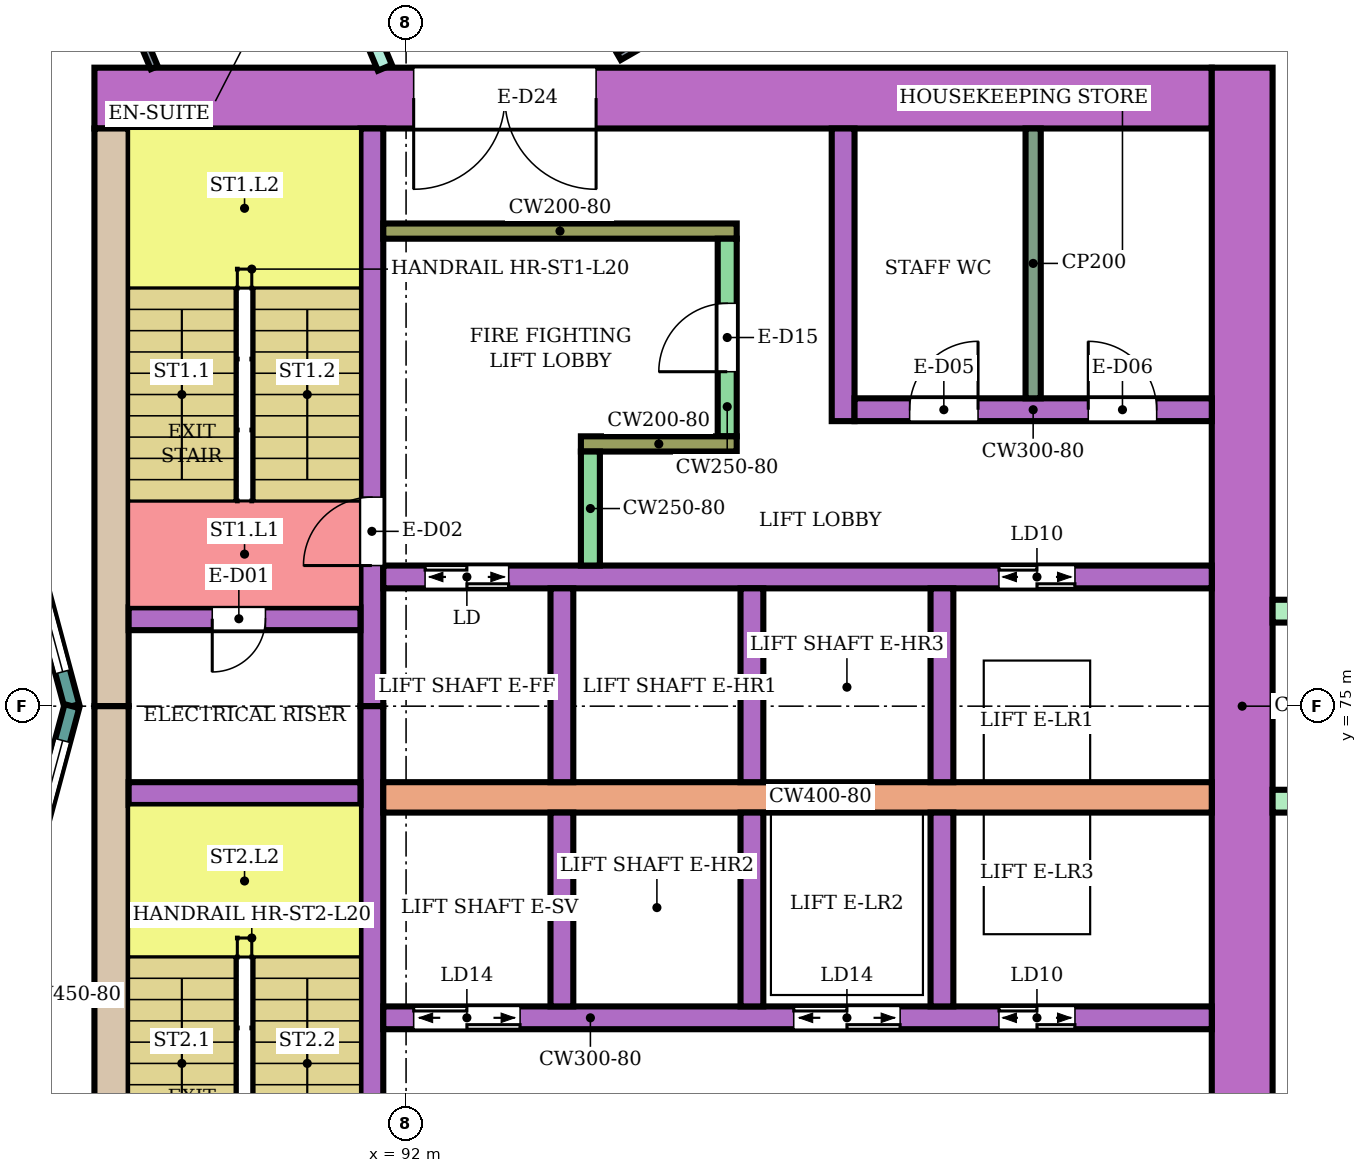
"""IFC4 building model, lengths in metres.
Left out: names, types, materials, properties, quantities, classifications, styles, units other than length and angle.
Written with IfcOpenShell. Run it as: python <this file> out.ifc"""

import sys

from ifc_helpers import new_model, si_unit, direction, frame, frame_2d, origin, place, context, subcontext, project, spatial, rectangle, extrude, element, fill, save


model = new_model("IFC4")
c1 = context("Model", 3, precision=1e-05, world=origin(), true_north=direction((0.0, 1.0)))
c2 = subcontext(c1, "Body", "Model", "MODEL_VIEW")
j1 = project(units=[si_unit("LENGTHUNIT", "METRE"), si_unit("PLANEANGLEUNIT", "RADIAN")], contexts=[c1])
p1 = place(None, origin())
s1 = spatial("IfcSite", under=j1, at=p1, CompositionType="ELEMENT")
p2 = place(p1, origin())
s2 = spatial("IfcBuilding", under=s1, at=p2, CompositionType="ELEMENT")
p3 = place(p2, frame((0.0, 0.0, 90.0)))
s3 = spatial("IfcBuildingStorey", under=s2, at=p3, CompositionType="ELEMENT", Elevation=90.0)
p4 = place(p3, frame((87.9, 83.0, 0.0), z_axis=(0.0, 0.0, 1.0), x_axis=(1.0, 0.0, 0.0)))
e1 = element("IfcWall", 1, at=p4, inside=s3, PredefinedType="SHEAR", context=c2, shape_type="SweptSolid", body=[
    extrude(rectangle(XDim=14.7, YDim=0.8, at=frame_2d((7.35, 0.0))), origin(), (0.0, 0.0, 1.0), 3.48),
])
p5 = place(p4, frame((4.2, 0.0, 0.0)))
e2 = element("IfcOpeningElement", 2, at=p5, cuts=e1, PredefinedType="OPENING", context=c2, shape_type="SweptSolid", body=[
    extrude(rectangle(XDim=2.4, YDim=2.4, at=frame_2d((1.2, 1.2))), frame((0.0, 0.41, 0.0), z_axis=(0.0, -1.0, 0.0), x_axis=(1.0, 0.0, 0.0)), (0.0, 0.0, 1.0), 0.82),
])
for number, where, z_axis, x_axis in (
    (3, (88.125, 75.0, 0.0), (0.0, 0.0, 1.0), (0.0, 1.0, 0.0)),
    (4, (88.125, 67.4, 0.0), (0.0, 0.0, 1.0), (0.0, 1.0, 0.0)),
):
    element("IfcWall", number, at=place(p3, frame(where, z_axis=z_axis, x_axis=x_axis)), inside=s3, PredefinedType="SHEAR", context=c2, shape_type="SweptSolid", body=[
        extrude(rectangle(XDim=7.6, YDim=0.45, at=frame_2d((3.8, 0.0))), origin(), (0.0, 0.0, 1.0), 3.48),
    ])
p6 = place(p3, frame((103.0, 66.6, 0.0), z_axis=(0.0, 0.0, 1.0), x_axis=(0.0, 1.0, 0.0)))
e5 = element("IfcWall", 5, at=p6, inside=s3, PredefinedType="SHEAR", context=c2, shape_type="SweptSolid", body=[
    extrude(rectangle(XDim=16.8, YDim=0.8, at=frame_2d((8.4, 0.0))), origin(), (0.0, 0.0, 1.0), 3.48),
])
p7 = place(p3, frame((91.55, 75.0, 0.0), z_axis=(0.0, 0.0, 1.0), x_axis=(0.0, 1.0, 0.0)))
e6 = element("IfcWall", 6, at=p7, inside=s3, PredefinedType="SHEAR", context=c2, shape_type="SweptSolid", body=[
    extrude(rectangle(XDim=7.6, YDim=0.3, at=frame_2d((3.8, 0.0))), origin(), (0.0, 0.0, 1.0), 3.48),
])
p8 = place(p7, frame((1.85, 0.0, 0.0)))
e7 = element("IfcOpeningElement", 7, at=p8, cuts=e6, PredefinedType="OPENING", context=c2, shape_type="SweptSolid", body=[
    extrude(rectangle(XDim=0.9, YDim=2.1, at=frame_2d((0.45, 1.05))), frame((0.0, 0.16, 0.0), z_axis=(0.0, -1.0, 0.0), x_axis=(1.0, 0.0, 0.0)), (0.0, 0.0, 1.0), 0.32),
])
p9 = place(p3, frame((91.55, 67.4, 0.0), z_axis=(0.0, 0.0, 1.0), x_axis=(0.0, 1.0, 0.0)))
e8 = element("IfcWall", 8, at=p9, inside=s3, PredefinedType="SHEAR", context=c2, shape_type="SweptSolid", body=[
    extrude(rectangle(XDim=7.6, YDim=0.3, at=frame_2d((3.8, 0.0))), origin(), (0.0, 0.0, 1.0), 3.48),
])
p10 = place(p9, frame((0.25, 0.0, 0.0)))
e9 = element("IfcOpeningElement", 9, at=p10, cuts=e8, PredefinedType="OPENING", context=c2, shape_type="SweptSolid", body=[
    extrude(rectangle(XDim=0.9, YDim=2.1, at=frame_2d((0.45, 1.05))), frame((0.0, 0.16, 0.0), z_axis=(0.0, -1.0, 0.0), x_axis=(1.0, 0.0, 0.0)), (0.0, 0.0, 1.0), 0.32),
])
p11 = place(p3, frame((88.35, 76.15, 0.0), z_axis=(0.0, 0.0, 1.0), x_axis=(1.0, 0.0, 0.0)))
e10 = element("IfcWall", 10, at=p11, inside=s3, PredefinedType="SHEAR", context=c2, shape_type="SweptSolid", body=[
    extrude(rectangle(XDim=3.05, YDim=0.3, at=frame_2d((1.525, 0.0))), origin(), (0.0, 0.0, 1.0), 3.48),
])
p12 = place(p11, frame((1.1, 0.0, 0.0)))
e11 = element("IfcOpeningElement", 11, at=p12, cuts=e10, PredefinedType="OPENING", context=c2, shape_type="SweptSolid", body=[
    extrude(rectangle(XDim=0.7, YDim=2.0, at=frame_2d((0.35, 1.0))), frame((0.0, 0.16, 0.0), z_axis=(0.0, -1.0, 0.0), x_axis=(1.0, 0.0, 0.0)), (0.0, 0.0, 1.0), 0.32),
])
p13 = place(p3, frame((88.35, 73.85, 0.0), z_axis=(0.0, 0.0, 1.0), x_axis=(1.0, 0.0, 0.0)))
e12 = element("IfcWall", 12, at=p13, inside=s3, PredefinedType="SHEAR", context=c2, shape_type="SweptSolid", body=[
    extrude(rectangle(XDim=3.05, YDim=0.3, at=frame_2d((1.525, 0.0))), origin(), (0.0, 0.0, 1.0), 3.48),
])
p14 = place(p3, frame((91.7, 76.7, 0.0), z_axis=(0.0, 0.0, 1.0), x_axis=(1.0, 0.0, 0.0)))
e13 = element("IfcWall", 13, at=p14, inside=s3, PredefinedType="SHEAR", context=c2, shape_type="SweptSolid", body=[
    extrude(rectangle(XDim=10.9, YDim=0.3, at=frame_2d((5.45, 0.0))), origin(), (0.0, 0.0, 1.0), 3.48),
])
p15 = place(p14, frame((0.55, 0.0, 0.0)))
e14 = element("IfcOpeningElement", 14, at=p15, cuts=e13, PredefinedType="OPENING", context=c2, shape_type="SweptSolid", body=[
    extrude(rectangle(XDim=1.1, YDim=2.1, at=frame_2d((0.55, 1.05))), frame((0.0, 0.16, 0.0), z_axis=(0.0, -1.0, 0.0), x_axis=(1.0, 0.0, 0.0)), (0.0, 0.0, 1.0), 0.32),
])
p16 = place(p14, frame((8.1, 0.0, 0.0)))
e15 = element("IfcOpeningElement", 15, at=p16, cuts=e13, PredefinedType="OPENING", context=c2, shape_type="SweptSolid", body=[
    extrude(rectangle(XDim=1.0, YDim=2.1, at=frame_2d((0.5, 1.05))), frame((0.0, 0.16, 0.0), z_axis=(0.0, -1.0, 0.0), x_axis=(1.0, 0.0, 0.0)), (0.0, 0.0, 1.0), 0.32),
])
p17 = place(p3, frame((91.7, 73.8, 0.0), z_axis=(0.0, 0.0, 1.0), x_axis=(1.0, 0.0, 0.0)))
e16 = element("IfcWall", 16, at=p17, inside=s3, PredefinedType="SHEAR", context=c2, shape_type="SweptSolid", body=[
    extrude(rectangle(XDim=10.9, YDim=0.4, at=frame_2d((5.45, 0.0))), origin(), (0.0, 0.0, 1.0), 3.48),
])
p18 = place(p3, frame((91.7, 70.9, 0.0), z_axis=(0.0, 0.0, 1.0), x_axis=(1.0, 0.0, 0.0)))
e17 = element("IfcWall", 17, at=p18, inside=s3, PredefinedType="SHEAR", context=c2, shape_type="SweptSolid", body=[
    extrude(rectangle(XDim=10.9, YDim=0.3, at=frame_2d((5.45, 0.0))), origin(), (0.0, 0.0, 1.0), 3.48),
])
p19 = place(p18, frame((0.4, 0.0, 0.0)))
e18 = element("IfcOpeningElement", 18, at=p19, cuts=e17, PredefinedType="OPENING", context=c2, shape_type="SweptSolid", body=[
    extrude(rectangle(XDim=1.4, YDim=2.1, at=frame_2d((0.7, 1.05))), frame((0.0, 0.16, 0.0), z_axis=(0.0, -1.0, 0.0), x_axis=(1.0, 0.0, 0.0)), (0.0, 0.0, 1.0), 0.32),
])
p20 = place(p18, frame((5.4, 0.0, 0.0)))
e19 = element("IfcOpeningElement", 19, at=p20, cuts=e17, PredefinedType="OPENING", context=c2, shape_type="SweptSolid", body=[
    extrude(rectangle(XDim=1.4, YDim=2.1, at=frame_2d((0.7, 1.05))), frame((0.0, 0.16, 0.0), z_axis=(0.0, -1.0, 0.0), x_axis=(1.0, 0.0, 0.0)), (0.0, 0.0, 1.0), 0.32),
])
p21 = place(p18, frame((8.1, 0.0, 0.0)))
e20 = element("IfcOpeningElement", 20, at=p21, cuts=e17, PredefinedType="OPENING", context=c2, shape_type="SweptSolid", body=[
    extrude(rectangle(XDim=1.0, YDim=2.1, at=frame_2d((0.5, 1.05))), frame((0.0, 0.16, 0.0), z_axis=(0.0, -1.0, 0.0), x_axis=(1.0, 0.0, 0.0)), (0.0, 0.0, 1.0), 0.32),
])
for number, where, z_axis, x_axis in (
    (21, (94.05, 74.0, 0.0), (0.0, 0.0, 1.0), (0.0, 1.0, 0.0)),
    (22, (96.55, 74.0, 0.0), (0.0, 0.0, 1.0), (0.0, 1.0, 0.0)),
    (23, (99.05, 74.0, 0.0), (0.0, 0.0, 1.0), (0.0, 1.0, 0.0)),
    (24, (94.05, 71.05, 0.0), (0.0, 0.0, 1.0), (0.0, 1.0, 0.0)),
    (25, (96.55, 71.05, 0.0), (0.0, 0.0, 1.0), (0.0, 1.0, 0.0)),
    (26, (99.05, 71.05, 0.0), (0.0, 0.0, 1.0), (0.0, 1.0, 0.0)),
):
    element("IfcWall", number, at=place(p3, frame(where, z_axis=z_axis, x_axis=x_axis)), inside=s3, PredefinedType="SHEAR", context=c2, shape_type="SweptSolid", body=[
        extrude(rectangle(XDim=2.55, YDim=0.3, at=frame_2d((1.275, 0.0))), origin(), (0.0, 0.0, 1.0), 3.48),
    ])
p22 = place(p3, frame((91.7, 81.25, 0.0), z_axis=(0.0, 0.0, 1.0), x_axis=(1.0, 0.0, 0.0)))
e27 = element("IfcWall", 27, at=p22, inside=s3, PredefinedType="SHEAR", context=c2, shape_type="SweptSolid", body=[
    extrude(rectangle(XDim=4.65, YDim=0.2, at=frame_2d((2.325, 0.0))), origin(), (0.0, 0.0, 1.0), 3.48),
])
p23 = place(p3, frame((96.225, 78.55, 0.0), z_axis=(0.0, 0.0, 1.0), x_axis=(0.0, 1.0, 0.0)))
e28 = element("IfcWall", 28, at=p23, inside=s3, PredefinedType="SHEAR", context=c2, shape_type="SweptSolid", body=[
    extrude(rectangle(XDim=2.6, YDim=0.25, at=frame_2d((1.3, 0.0))), origin(), (0.0, 0.0, 1.0), 3.48),
])
p24 = place(p23, frame((0.85, 0.0, 0.0)))
e29 = element("IfcOpeningElement", 29, at=p24, cuts=e28, PredefinedType="OPENING", context=c2, shape_type="SweptSolid", body=[
    extrude(rectangle(XDim=0.9, YDim=2.1, at=frame_2d((0.45, 1.05))), frame((0.0, 0.135, 0.0), z_axis=(0.0, -1.0, 0.0), x_axis=(1.0, 0.0, 0.0)), (0.0, 0.0, 1.0), 0.27),
])
p25 = place(p3, frame((94.3, 78.45, 0.0), z_axis=(0.0, 0.0, 1.0), x_axis=(1.0, 0.0, 0.0)))
e30 = element("IfcWall", 30, at=p25, inside=s3, PredefinedType="SHEAR", context=c2, shape_type="SweptSolid", body=[
    extrude(rectangle(XDim=2.05, YDim=0.2, at=frame_2d((1.025, 0.0))), origin(), (0.0, 0.0, 1.0), 3.48),
])
p26 = place(p3, frame((94.425, 76.85, 0.0), z_axis=(0.0, 0.0, 1.0), x_axis=(0.0, 1.0, 0.0)))
e31 = element("IfcWall", 31, at=p26, inside=s3, PredefinedType="SHEAR", context=c2, shape_type="SweptSolid", body=[
    extrude(rectangle(XDim=1.5, YDim=0.25, at=frame_2d((0.75, 0.0))), origin(), (0.0, 0.0, 1.0), 3.48),
])
p27 = place(p3, frame((97.75, 78.75, 0.0), z_axis=(0.0, 0.0, 1.0), x_axis=(0.0, 1.0, 0.0)))
e32 = element("IfcWall", 32, at=p27, inside=s3, PredefinedType="SHEAR", context=c2, shape_type="SweptSolid", body=[
    extrude(rectangle(XDim=3.85, YDim=0.3, at=frame_2d((1.925, 0.0))), origin(), (0.0, 0.0, 1.0), 3.48),
])
p28 = place(p3, frame((97.9, 78.9, 0.0), z_axis=(0.0, 0.0, 1.0), x_axis=(1.0, 0.0, 0.0)))
e33 = element("IfcWall", 33, at=p28, inside=s3, PredefinedType="SHEAR", context=c2, shape_type="SweptSolid", body=[
    extrude(rectangle(XDim=4.7, YDim=0.3, at=frame_2d((2.35, 0.0))), origin(), (0.0, 0.0, 1.0), 3.48),
])
p29 = place(p28, frame((0.725, 0.0, 0.0)))
e34 = element("IfcOpeningElement", 34, at=p29, cuts=e33, PredefinedType="OPENING", context=c2, shape_type="SweptSolid", body=[
    extrude(rectangle(XDim=0.9, YDim=2.1, at=frame_2d((0.45, 1.05))), frame((0.0, 0.16, 0.0), z_axis=(0.0, -1.0, 0.0), x_axis=(1.0, 0.0, 0.0)), (0.0, 0.0, 1.0), 0.32),
])
p30 = place(p28, frame((3.075, 0.0, 0.0)))
e35 = element("IfcOpeningElement", 35, at=p30, cuts=e33, PredefinedType="OPENING", context=c2, shape_type="SweptSolid", body=[
    extrude(rectangle(XDim=0.9, YDim=2.1, at=frame_2d((0.45, 1.05))), frame((0.0, 0.16, 0.0), z_axis=(0.0, -1.0, 0.0), x_axis=(1.0, 0.0, 0.0)), (0.0, 0.0, 1.0), 0.32),
])
for number, where, z_axis, x_axis in (
    (36, (103.4, 73.75, 0.0), (0.0, 0.0, 1.0), (1.0, 0.0, 0.0)),
    (37, (103.4, 76.25, 0.0), (0.0, 0.0, 1.0), (1.0, 0.0, 0.0)),
):
    element("IfcWall", number, at=place(p3, frame(where, z_axis=z_axis, x_axis=x_axis)), inside=s3, PredefinedType="NOTDEFINED", context=c2, shape_type="SweptSolid", body=[
        extrude(rectangle(XDim=2.416, YDim=0.3, at=frame_2d((1.208, 0.0))), origin(), (0.0, 0.0, 1.0), 3.8),
    ])
p31 = place(p3, frame((87.604, 75.0, 0.0), z_axis=(0.0, 0.0, 1.0), x_axis=(-0.258789828301, 0.965933654434, 0.0)))
e38 = element("IfcWall", 38, at=p31, inside=s3, PredefinedType="NOTDEFINED", context=c2, shape_type="SweptSolid", body=[
    extrude(rectangle(XDim=3.936, YDim=0.2, at=frame_2d((1.968, 0.0))), origin(), (0.0, 0.0, 1.0), 3.8),
])
p32 = place(p31, frame((0.468, 0.0, 0.9)))
e39 = element("IfcOpeningElement", 39, at=p32, cuts=e38, PredefinedType="OPENING", context=c2, shape_type="SweptSolid", body=[
    extrude(rectangle(XDim=3.0, YDim=2.3, at=frame_2d((1.5, 1.15))), frame((0.0, 0.11, 0.0), z_axis=(0.0, -1.0, 0.0), x_axis=(1.0, 0.0, 0.0)), (0.0, 0.0, 1.0), 0.22),
])
p33 = place(p3, frame((86.585, 71.198, 0.0), z_axis=(0.0, 0.0, 1.0), x_axis=(0.258789828301, 0.965933654434, 0.0)))
e40 = element("IfcWall", 40, at=p33, inside=s3, PredefinedType="NOTDEFINED", context=c2, shape_type="SweptSolid", body=[
    extrude(rectangle(XDim=3.936, YDim=0.2, at=frame_2d((1.968, 0.0))), origin(), (0.0, 0.0, 1.0), 3.8),
])
p34 = place(p33, frame((0.468, 0.0, 0.9)))
e41 = element("IfcOpeningElement", 41, at=p34, cuts=e40, PredefinedType="OPENING", context=c2, shape_type="SweptSolid", body=[
    extrude(rectangle(XDim=3.0, YDim=2.3, at=frame_2d((1.5, 1.15))), frame((0.0, 0.11, 0.0), z_axis=(0.0, -1.0, 0.0), x_axis=(1.0, 0.0, 0.0)), (0.0, 0.0, 1.0), 0.22),
])
p35 = place(p3, frame((83.85, 81.667, 0.0), z_axis=(0.0, 0.0, 1.0), x_axis=(0.500222212082, 0.865897071562, 0.0)))
e42 = element("IfcWall", 42, at=p35, inside=s3, PredefinedType="PARTITIONING", context=c2, shape_type="SweptSolid", body=[
    extrude(rectangle(XDim=9.768, YDim=0.2, at=frame_2d((4.884, 0.0))), origin(), (0.0, 0.0, 1.0), 3.35),
])
p36 = place(p3, frame((88.698, 90.624, 0.0), z_axis=(0.0, 0.0, 1.0), x_axis=(0.386027055918, -0.922487459047, 0.0)))
e43 = element("IfcWall", 43, at=p36, inside=s3, PredefinedType="PARTITIONING", context=c2, shape_type="SweptSolid", body=[
    extrude(rectangle(XDim=7.832, YDim=0.2, at=frame_2d((3.916, 0.0))), origin(), (0.0, 0.0, 1.0), 3.35),
])
p37 = place(p36, frame((1.482, 0.0, 0.0)))
e44 = element("IfcOpeningElement", 44, at=p37, cuts=e43, PredefinedType="OPENING", context=c2, shape_type="SweptSolid", body=[
    extrude(rectangle(XDim=1.0, YDim=2.1, at=frame_2d((0.5, 1.05))), frame((0.0, 0.11, 0.0), z_axis=(0.0, -1.0, 0.0), x_axis=(1.0, 0.0, 0.0)), (0.0, 0.0, 1.0), 0.22),
])
p38 = place(p3, frame((88.348, 84.209, 0.0), z_axis=(0.0, 0.0, 1.0), x_axis=(0.386077497504, -0.922466349479, 0.0)))
e45 = element("IfcWall", 45, at=p38, inside=s3, PredefinedType="PARTITIONING", context=c2, shape_type="SweptSolid", body=[
    extrude(rectangle(XDim=0.877, YDim=0.1, at=frame_2d((0.438, 0.0))), origin(), (0.0, 0.0, 1.0), 3.35),
])
p39 = place(p3, frame((94.8, 83.545, 0.0), z_axis=(0.0, 0.0, 1.0), x_axis=(0.86602264145, 0.500004784474, 0.0)))
e46 = element("IfcWall", 46, at=p39, inside=s3, PredefinedType="PARTITIONING", context=c2, shape_type="SweptSolid", body=[
    extrude(rectangle(XDim=8.708, YDim=0.1, at=frame_2d((4.354, 0.0))), origin(), (0.0, 0.0, 1.0), 3.35),
])
p40 = place(p39, frame((3.879, 0.0, 0.0)))
e47 = element("IfcOpeningElement", 47, at=p40, cuts=e46, PredefinedType="OPENING", context=c2, shape_type="SweptSolid", body=[
    extrude(rectangle(XDim=0.9, YDim=2.1, at=frame_2d((0.45, 1.05))), frame((0.0, 0.06, 0.0), z_axis=(0.0, -1.0, 0.0), x_axis=(1.0, 0.0, 0.0)), (0.0, 0.0, 1.0), 0.12),
])
p41 = place(p3, frame((100.25, 79.05, 0.0), z_axis=(0.0, 0.0, 1.0), x_axis=(0.0, 1.0, 0.0)))
e48 = element("IfcWall", 48, at=p41, inside=s3, PredefinedType="PARTITIONING", context=c2, shape_type="SweptSolid", body=[
    extrude(rectangle(XDim=3.55, YDim=0.2, at=frame_2d((1.775, 0.0))), origin(), (0.0, 0.0, 1.0), 3.48),
])
p42 = place(p32, origin())
e49 = element("IfcWindow", 49, at=p42, inside=s3, PartitioningType="SINGLE_PANEL", PredefinedType="WINDOW", context=c2, shape_type="SweptSolid", body=[
    extrude(rectangle(XDim=3.0, YDim=2.3, at=frame_2d((1.5, 1.15))), frame((0.0, 0.03, 0.0), z_axis=(0.0, -1.0, 0.0), x_axis=(1.0, 0.0, 0.0)), (0.0, 0.0, 1.0), 0.06),
])
fill(e39, e49)
p43 = place(p34, origin())
e50 = element("IfcWindow", 50, at=p43, inside=s3, PartitioningType="SINGLE_PANEL", PredefinedType="WINDOW", context=c2, shape_type="SweptSolid", body=[
    extrude(rectangle(XDim=3.0, YDim=2.3, at=frame_2d((1.5, 1.15))), frame((0.0, 0.03, 0.0), z_axis=(0.0, -1.0, 0.0), x_axis=(1.0, 0.0, 0.0)), (0.0, 0.0, 1.0), 0.06),
])
fill(e41, e50)
p44 = place(p12, frame((0.7, 0.0, 0.0), z_axis=(0.0, 0.0, 1.0), x_axis=(-1.0, 0.0, 0.0)))
e51 = element("IfcDoor", 51, at=p44, inside=s3, OperationType="SINGLE_SWING_RIGHT", PredefinedType="DOOR", context=c2, shape_type="SweptSolid", body=[
    extrude(rectangle(XDim=0.7, YDim=2.0, at=frame_2d((0.35, 1.0))), frame((0.0, 0.025, 0.0), z_axis=(0.0, -1.0, 0.0), x_axis=(1.0, 0.0, 0.0)), (0.0, 0.0, 1.0), 0.05),
])
fill(e11, e51)
p45 = place(p8, origin())
e52 = element("IfcDoor", 52, at=p45, inside=s3, OperationType="SINGLE_SWING_LEFT", PredefinedType="DOOR", context=c2, shape_type="SweptSolid", body=[
    extrude(rectangle(XDim=0.9, YDim=2.1, at=frame_2d((0.45, 1.05))), frame((0.0, 0.025, 0.0), z_axis=(0.0, -1.0, 0.0), x_axis=(1.0, 0.0, 0.0)), (0.0, 0.0, 1.0), 0.05),
])
fill(e7, e52)
p46 = place(p15, origin())
e53 = element("IfcDoor", 53, at=p46, inside=s3, OperationType="DOUBLE_DOOR_SLIDING", PredefinedType="DOOR", context=c2, shape_type="SweptSolid", body=[
    extrude(rectangle(XDim=1.1, YDim=2.1, at=frame_2d((0.55, 1.05))), frame((0.0, 0.025, 0.0), z_axis=(0.0, -1.0, 0.0), x_axis=(1.0, 0.0, 0.0)), (0.0, 0.0, 1.0), 0.05),
])
fill(e14, e53)
p47 = place(p16, origin())
e54 = element("IfcDoor", 54, at=p47, inside=s3, OperationType="DOUBLE_DOOR_SLIDING", PredefinedType="DOOR", context=c2, shape_type="SweptSolid", body=[
    extrude(rectangle(XDim=1.0, YDim=2.1, at=frame_2d((0.5, 1.05))), frame((0.0, 0.025, 0.0), z_axis=(0.0, -1.0, 0.0), x_axis=(1.0, 0.0, 0.0)), (0.0, 0.0, 1.0), 0.05),
])
fill(e15, e54)
p48 = place(p19, origin())
e55 = element("IfcDoor", 55, at=p48, inside=s3, OperationType="DOUBLE_DOOR_SLIDING", PredefinedType="DOOR", context=c2, shape_type="SweptSolid", body=[
    extrude(rectangle(XDim=1.4, YDim=2.1, at=frame_2d((0.7, 1.05))), frame((0.0, 0.025, 0.0), z_axis=(0.0, -1.0, 0.0), x_axis=(1.0, 0.0, 0.0)), (0.0, 0.0, 1.0), 0.05),
])
fill(e18, e55)
p49 = place(p20, origin())
e56 = element("IfcDoor", 56, at=p49, inside=s3, OperationType="DOUBLE_DOOR_SLIDING", PredefinedType="DOOR", context=c2, shape_type="SweptSolid", body=[
    extrude(rectangle(XDim=1.4, YDim=2.1, at=frame_2d((0.7, 1.05))), frame((0.0, 0.025, 0.0), z_axis=(0.0, -1.0, 0.0), x_axis=(1.0, 0.0, 0.0)), (0.0, 0.0, 1.0), 0.05),
])
fill(e19, e56)
p50 = place(p21, origin())
e57 = element("IfcDoor", 57, at=p50, inside=s3, OperationType="DOUBLE_DOOR_SLIDING", PredefinedType="DOOR", context=c2, shape_type="SweptSolid", body=[
    extrude(rectangle(XDim=1.0, YDim=2.1, at=frame_2d((0.5, 1.05))), frame((0.0, 0.025, 0.0), z_axis=(0.0, -1.0, 0.0), x_axis=(1.0, 0.0, 0.0)), (0.0, 0.0, 1.0), 0.05),
])
fill(e20, e57)
p51 = place(p24, origin())
e58 = element("IfcDoor", 58, at=p51, inside=s3, OperationType="SINGLE_SWING_LEFT", PredefinedType="DOOR", context=c2, shape_type="SweptSolid", body=[
    extrude(rectangle(XDim=0.9, YDim=2.1, at=frame_2d((0.45, 1.05))), frame((0.0, 0.025, 0.0), z_axis=(0.0, -1.0, 0.0), x_axis=(1.0, 0.0, 0.0)), (0.0, 0.0, 1.0), 0.05),
])
fill(e29, e58)
p52 = place(p29, origin())
e59 = element("IfcDoor", 59, at=p52, inside=s3, OperationType="SINGLE_SWING_RIGHT", PredefinedType="DOOR", context=c2, shape_type="SweptSolid", body=[
    extrude(rectangle(XDim=0.9, YDim=2.1, at=frame_2d((0.45, 1.05))), frame((0.0, 0.025, 0.0), z_axis=(0.0, -1.0, 0.0), x_axis=(1.0, 0.0, 0.0)), (0.0, 0.0, 1.0), 0.05),
])
fill(e34, e59)
p53 = place(p30, origin())
e60 = element("IfcDoor", 60, at=p53, inside=s3, OperationType="SINGLE_SWING_LEFT", PredefinedType="DOOR", context=c2, shape_type="SweptSolid", body=[
    extrude(rectangle(XDim=0.9, YDim=2.1, at=frame_2d((0.45, 1.05))), frame((0.0, 0.025, 0.0), z_axis=(0.0, -1.0, 0.0), x_axis=(1.0, 0.0, 0.0)), (0.0, 0.0, 1.0), 0.05),
])
fill(e35, e60)
p54 = place(p5, frame((2.4, 0.0, 0.0), z_axis=(0.0, 0.0, 1.0), x_axis=(-1.0, 0.0, 0.0)))
e61 = element("IfcDoor", 61, at=p54, inside=s3, OperationType="DOUBLE_DOOR_SINGLE_SWING", PredefinedType="DOOR", context=c2, shape_type="SweptSolid", body=[
    extrude(rectangle(XDim=2.4, YDim=2.4, at=frame_2d((1.2, 1.2))), frame((0.0, 0.025, 0.0), z_axis=(0.0, -1.0, 0.0), x_axis=(1.0, 0.0, 0.0)), (0.0, 0.0, 1.0), 0.05),
])
fill(e2, e61)
save(model, sys.argv[1])
